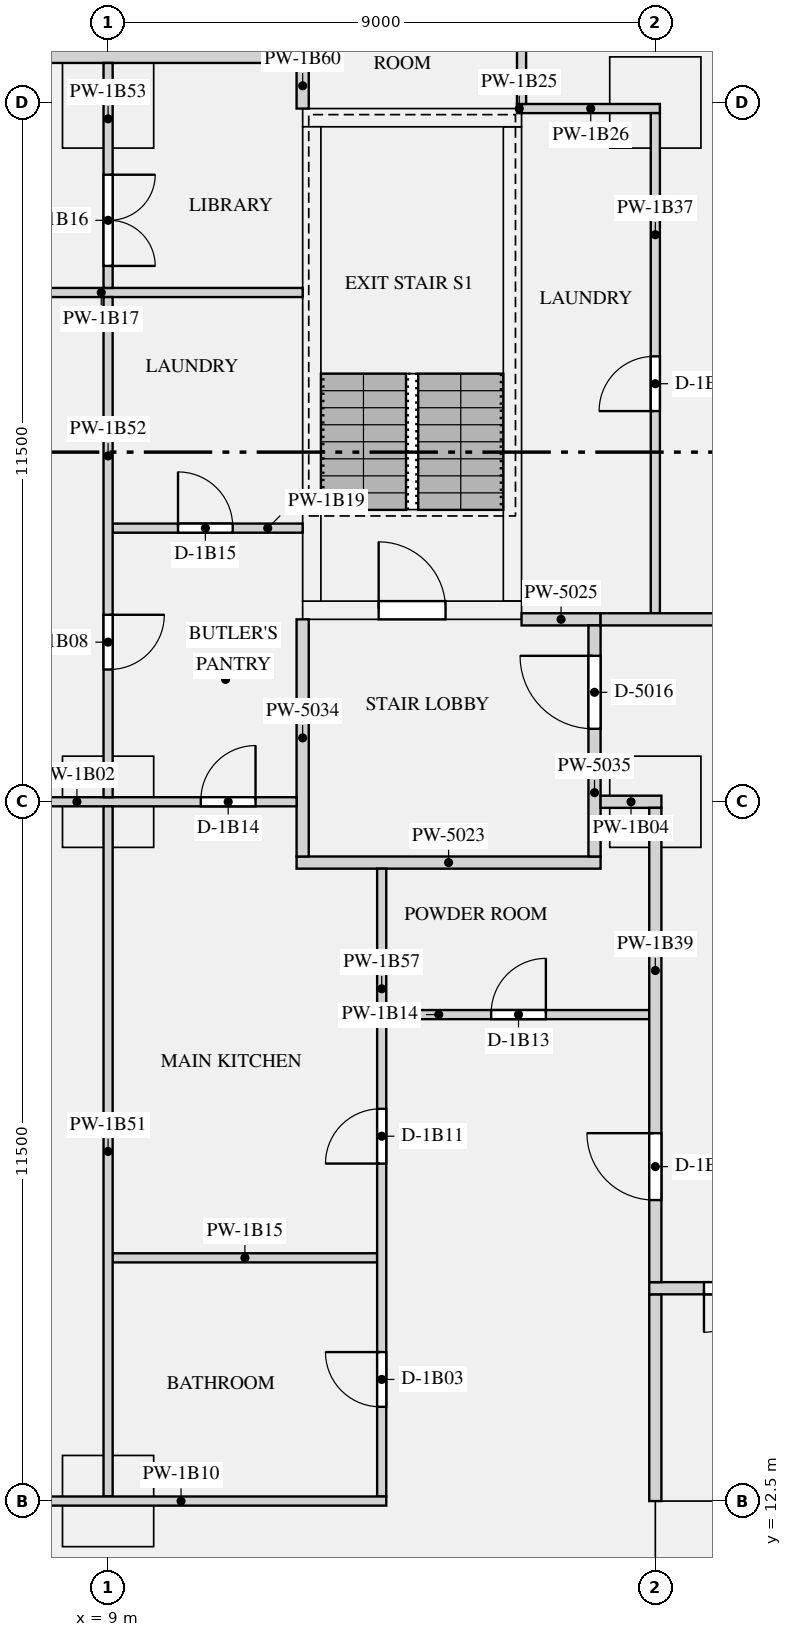
"""IFC4 building model, lengths in metres.
Left out: names, types, materials, properties, quantities, classifications, styles, units other than length and angle.
Written with IfcOpenShell. Run it as: python <this file> out.ifc"""

import sys

from ifc_helpers import new_model, si_unit, direction, frame, frame_2d, origin, origin_2d, place, context, subcontext, project, spatial, rectangle, extrude, element, fill, save


model = new_model("IFC4")
c1 = context("Model", 3, precision=1e-05, world=origin(), true_north=direction((0.0, 1.0)))
c2 = subcontext(c1, "Body", "Model", "MODEL_VIEW")
j1 = project(units=[si_unit("LENGTHUNIT", "METRE"), si_unit("PLANEANGLEUNIT", "RADIAN")], contexts=[c1])
p1 = place(None, origin())
s1 = spatial("IfcSite", under=j1, at=p1, CompositionType="ELEMENT")
p2 = place(p1, origin())
s2 = spatial("IfcBuilding", under=s1, at=p2, CompositionType="ELEMENT")
p3 = place(p2, frame((0.0, 0.0, 28.95)))
s3 = spatial("IfcBuildingStorey", under=s2, at=p3, CompositionType="ELEMENT", Elevation=28.95)
for number, where, z_axis, x_axis in (
    (1, (9.0, 24.0, 0.0), (0.0, 0.0, 1.0), (1.0, 0.0, 0.0)),
    (2, (18.0, 24.0, 0.0), (0.0, 0.0, 1.0), (1.0, 0.0, 0.0)),
    (3, (9.0, 35.5, 0.0), (0.0, 0.0, 1.0), (1.0, 0.0, 0.0)),
    (4, (18.0, 35.5, 0.0), (0.0, 0.0, 1.0), (1.0, 0.0, 0.0)),
    (5, (9.0, 12.5, 0.0), (0.0, 0.0, 1.0), (1.0, 0.0, 0.0)),
):
    element("IfcColumn", number, at=place(p3, frame(where, z_axis=z_axis, x_axis=x_axis)), inside=s3, PredefinedType="COLUMN", context=c2, shape_type="SweptSolid", body=[
        extrude(rectangle(XDim=1.5, YDim=1.5, at=origin_2d()), origin(), (0.0, 0.0, 1.0), 3.15),
    ])
p4 = place(p3, frame((18.5, 0.0, 0.0), z_axis=(0.0, 0.0, 1.0), x_axis=(0.0, 1.0, 0.0)))
e6 = element("IfcWall", 6, at=p4, inside=s3, PredefinedType="SHEAR", context=c2, shape_type="SweptSolid", body=[
    extrude(rectangle(XDim=12.5, YDim=1.0, at=frame_2d((6.25, 0.0))), origin(), (0.0, 0.0, 1.0), 3.15),
])
p5 = place(p3, frame((12.2, 27.15, 0.0), z_axis=(0.0, 0.0, 1.0), x_axis=(1.0, 0.0, 0.0)))
e7 = element("IfcWall", 7, at=p5, inside=s3, PredefinedType="SHEAR", context=c2, shape_type="SweptSolid", body=[
    extrude(rectangle(XDim=3.6, YDim=0.3, at=frame_2d((1.8, 0.0))), origin(), (0.0, 0.0, 1.0), 3.15),
])
p6 = place(p5, frame((1.25, 0.0, 0.0)))
e8 = element("IfcOpeningElement", 8, at=p6, cuts=e7, PredefinedType="OPENING", context=c2, shape_type="SweptSolid", body=[
    extrude(rectangle(XDim=1.1, YDim=2.1, at=frame_2d((0.55, 1.05))), frame((0.0, 0.16, 0.0), z_axis=(0.0, -1.0, 0.0), x_axis=(1.0, 0.0, 0.0)), (0.0, 0.0, 1.0), 0.32),
])
p7 = place(p3, frame((12.2, 35.25, 0.0), z_axis=(0.0, 0.0, 1.0), x_axis=(1.0, 0.0, 0.0)))
e9 = element("IfcWall", 9, at=p7, inside=s3, PredefinedType="SHEAR", context=c2, shape_type="SweptSolid", body=[
    extrude(rectangle(XDim=3.6, YDim=0.3, at=frame_2d((1.8, 0.0))), origin(), (0.0, 0.0, 1.0), 3.15),
])
for number, where, z_axis, x_axis in (
    (10, (12.35, 27.3, 0.0), (0.0, 0.0, 1.0), (0.0, 1.0, 0.0)),
    (11, (15.65, 27.3, 0.0), (0.0, 0.0, 1.0), (0.0, 1.0, 0.0)),
):
    element("IfcWall", number, at=place(p3, frame(where, z_axis=z_axis, x_axis=x_axis)), inside=s3, PredefinedType="SHEAR", context=c2, shape_type="SweptSolid", body=[
        extrude(rectangle(XDim=7.8, YDim=0.3, at=frame_2d((3.9, 0.0))), origin(), (0.0, 0.0, 1.0), 3.15),
    ])
p8 = place(p3, frame((12.1, 23.0, 0.0), z_axis=(0.0, 0.0, 1.0), x_axis=(1.0, 0.0, 0.0)))
e12 = element("IfcWall", 12, at=p8, inside=s3, PredefinedType="PARTITIONING", context=c2, shape_type="SweptSolid", body=[
    extrude(rectangle(XDim=5.0, YDim=0.2, at=frame_2d((2.5, 0.0))), origin(), (0.0, 0.0, 1.0), 2.83),
])
p9 = place(p3, frame((15.8, 27.0, 0.0), z_axis=(0.0, 0.0, 1.0), x_axis=(1.0, 0.0, 0.0)))
e13 = element("IfcWall", 13, at=p9, inside=s3, PredefinedType="PARTITIONING", context=c2, shape_type="SweptSolid", body=[
    extrude(rectangle(XDim=1.3, YDim=0.2, at=frame_2d((0.65, 0.0))), origin(), (0.0, 0.0, 1.0), 2.83),
])
p10 = place(p3, frame((18.0, 12.5, 0.0), z_axis=(0.0, 0.0, 1.0), x_axis=(0.0, 1.0, 0.0)))
e14 = element("IfcWall", 14, at=p10, inside=s3, PredefinedType="PARTITIONING", context=c2, shape_type="SweptSolid", body=[
    extrude(rectangle(XDim=3.4, YDim=0.2, at=frame_2d((1.7, 0.0))), origin(), (0.0, 0.0, 1.0), 2.83),
])
p11 = place(p3, frame((12.2, 23.1, 0.0), z_axis=(0.0, 0.0, 1.0), x_axis=(0.0, 1.0, 0.0)))
e15 = element("IfcWall", 15, at=p11, inside=s3, PredefinedType="PARTITIONING", context=c2, shape_type="SweptSolid", body=[
    extrude(rectangle(XDim=3.9, YDim=0.2, at=frame_2d((1.95, 0.0))), origin(), (0.0, 0.0, 1.0), 2.83),
])
p12 = place(p3, frame((17.0, 23.1, 0.0), z_axis=(0.0, 0.0, 1.0), x_axis=(0.0, 1.0, 0.0)))
e16 = element("IfcWall", 16, at=p12, inside=s3, PredefinedType="PARTITIONING", context=c2, shape_type="SweptSolid", body=[
    extrude(rectangle(XDim=3.8, YDim=0.2, at=frame_2d((1.9, 0.0))), origin(), (0.0, 0.0, 1.0), 2.83),
])
p13 = place(p12, frame((2.1, 0.0, 0.0)))
e17 = element("IfcOpeningElement", 17, at=p13, cuts=e16, PredefinedType="OPENING", context=c2, shape_type="SweptSolid", body=[
    extrude(rectangle(XDim=1.2, YDim=2.1, at=frame_2d((0.6, 1.05))), frame((0.0, 0.11, 0.0), z_axis=(0.0, -1.0, 0.0), x_axis=(1.0, 0.0, 0.0)), (0.0, 0.0, 1.0), 0.22),
])
p14 = place(p3, frame((3.3, 24.0, 0.0), z_axis=(0.0, 0.0, 1.0), x_axis=(1.0, 0.0, 0.0)))
e18 = element("IfcWall", 18, at=p14, inside=s3, PredefinedType="PARTITIONING", context=c2, shape_type="SweptSolid", body=[
    extrude(rectangle(XDim=8.8, YDim=0.15, at=frame_2d((4.4, 0.0))), origin(), (0.0, 0.0, 1.0), 2.83),
])
p15 = place(p14, frame((1.65, 0.0, 0.0)))
e19 = element("IfcOpeningElement", 19, at=p15, cuts=e18, PredefinedType="OPENING", context=c2, shape_type="SweptSolid", body=[
    extrude(rectangle(XDim=1.5, YDim=2.1, at=frame_2d((0.75, 1.05))), frame((0.0, 0.085, 0.0), z_axis=(0.0, -1.0, 0.0), x_axis=(1.0, 0.0, 0.0)), (0.0, 0.0, 1.0), 0.17),
])
p16 = place(p14, frame((7.225, 0.0, 0.0)))
e20 = element("IfcOpeningElement", 20, at=p16, cuts=e18, PredefinedType="OPENING", context=c2, shape_type="SweptSolid", body=[
    extrude(rectangle(XDim=0.9, YDim=2.1, at=frame_2d((0.45, 1.05))), frame((0.0, 0.085, 0.0), z_axis=(0.0, -1.0, 0.0), x_axis=(1.0, 0.0, 0.0)), (0.0, 0.0, 1.0), 0.17),
])
p17 = place(p3, frame((17.1, 24.0, 0.0), z_axis=(0.0, 0.0, 1.0), x_axis=(1.0, 0.0, 0.0)))
e21 = element("IfcWall", 21, at=p17, inside=s3, PredefinedType="PARTITIONING", context=c2, shape_type="SweptSolid", body=[
    extrude(rectangle(XDim=1.0, YDim=0.2, at=frame_2d((0.5, 0.0))), origin(), (0.0, 0.0, 1.0), 2.83),
])
p18 = place(p3, frame((17.1, 27.0, 0.0), z_axis=(0.0, 0.0, 1.0), x_axis=(1.0, 0.0, 0.0)))
e22 = element("IfcWall", 22, at=p18, inside=s3, PredefinedType="PARTITIONING", context=c2, shape_type="SweptSolid", body=[
    extrude(rectangle(XDim=7.0, YDim=0.2, at=frame_2d((3.5, 0.0))), origin(), (0.0, 0.0, 1.0), 2.83),
])
p19 = place(p3, frame((0.8, 12.5, 0.0), z_axis=(0.0, 0.0, 1.0), x_axis=(1.0, 0.0, 0.0)))
e23 = element("IfcWall", 23, at=p19, inside=s3, PredefinedType="PARTITIONING", context=c2, shape_type="SweptSolid", body=[
    extrude(rectangle(XDim=12.775, YDim=0.15, at=frame_2d((6.387, 0.0))), origin(), (0.0, 0.0, 1.0), 2.83),
])
p20 = place(p19, frame((5.125, 0.0, 0.0)))
e24 = element("IfcOpeningElement", 24, at=p20, cuts=e23, PredefinedType="OPENING", context=c2, shape_type="SweptSolid", body=[
    extrude(rectangle(XDim=0.9, YDim=2.1, at=frame_2d((0.45, 1.05))), frame((0.0, 0.085, 0.0), z_axis=(0.0, -1.0, 0.0), x_axis=(1.0, 0.0, 0.0)), (0.0, 0.0, 1.0), 0.17),
])
p21 = place(p3, frame((13.575, 20.5, 0.0), z_axis=(0.0, 0.0, 1.0), x_axis=(1.0, 0.0, 0.0)))
e25 = element("IfcWall", 25, at=p21, inside=s3, PredefinedType="PARTITIONING", context=c2, shape_type="SweptSolid", body=[
    extrude(rectangle(XDim=4.325, YDim=0.15, at=frame_2d((2.163, 0.0))), origin(), (0.0, 0.0, 1.0), 2.83),
])
p22 = place(p21, frame((1.725, 0.0, 0.0)))
e26 = element("IfcOpeningElement", 26, at=p22, cuts=e25, PredefinedType="OPENING", context=c2, shape_type="SweptSolid", body=[
    extrude(rectangle(XDim=0.9, YDim=2.1, at=frame_2d((0.45, 1.05))), frame((0.0, 0.085, 0.0), z_axis=(0.0, -1.0, 0.0), x_axis=(1.0, 0.0, 0.0)), (0.0, 0.0, 1.0), 0.17),
])
p23 = place(p3, frame((9.075, 16.5, 0.0), z_axis=(0.0, 0.0, 1.0), x_axis=(1.0, 0.0, 0.0)))
e27 = element("IfcWall", 27, at=p23, inside=s3, PredefinedType="PARTITIONING", context=c2, shape_type="SweptSolid", body=[
    extrude(rectangle(XDim=4.35, YDim=0.15, at=frame_2d((2.175, 0.0))), origin(), (0.0, 0.0, 1.0), 2.83),
])
p24 = place(p3, frame((0.8, 32.375, 0.0), z_axis=(0.0, 0.0, 1.0), x_axis=(1.0, 0.0, 0.0)))
e28 = element("IfcWall", 28, at=p24, inside=s3, PredefinedType="PARTITIONING", context=c2, shape_type="SweptSolid", body=[
    extrude(rectangle(XDim=11.4, YDim=0.15, at=frame_2d((5.7, 0.0))), origin(), (0.0, 0.0, 1.0), 2.83),
])
p25 = place(p24, frame((3.275, 0.0, 0.0)))
e29 = element("IfcOpeningElement", 29, at=p25, cuts=e28, PredefinedType="OPENING", context=c2, shape_type="SweptSolid", body=[
    extrude(rectangle(XDim=1.5, YDim=2.1, at=frame_2d((0.75, 1.05))), frame((0.0, 0.085, 0.0), z_axis=(0.0, -1.0, 0.0), x_axis=(1.0, 0.0, 0.0)), (0.0, 0.0, 1.0), 0.17),
])
p26 = place(p3, frame((9.075, 28.5, 0.0), z_axis=(0.0, 0.0, 1.0), x_axis=(1.0, 0.0, 0.0)))
e30 = element("IfcWall", 30, at=p26, inside=s3, PredefinedType="PARTITIONING", context=c2, shape_type="SweptSolid", body=[
    extrude(rectangle(XDim=3.125, YDim=0.15, at=frame_2d((1.562, 0.0))), origin(), (0.0, 0.0, 1.0), 2.83),
])
p27 = place(p26, frame((1.075, 0.0, 0.0)))
e31 = element("IfcOpeningElement", 31, at=p27, cuts=e30, PredefinedType="OPENING", context=c2, shape_type="SweptSolid", body=[
    extrude(rectangle(XDim=0.9, YDim=2.1, at=frame_2d((0.45, 1.05))), frame((0.0, 0.085, 0.0), z_axis=(0.0, -1.0, 0.0), x_axis=(1.0, 0.0, 0.0)), (0.0, 0.0, 1.0), 0.17),
])
p28 = place(p3, frame((0.8, 36.25, 0.0), z_axis=(0.0, 0.0, 1.0), x_axis=(1.0, 0.0, 0.0)))
e32 = element("IfcWall", 32, at=p28, inside=s3, PredefinedType="PARTITIONING", context=c2, shape_type="SweptSolid", body=[
    extrude(rectangle(XDim=11.475, YDim=0.2, at=frame_2d((5.737, 0.0))), origin(), (0.0, 0.0, 1.0), 2.83),
])
p29 = place(p3, frame((15.725, 35.4, 0.0), z_axis=(0.0, 0.0, 1.0), x_axis=(1.0, 0.0, 0.0)))
e33 = element("IfcWall", 33, at=p29, inside=s3, PredefinedType="PARTITIONING", context=c2, shape_type="SweptSolid", body=[
    extrude(rectangle(XDim=0.075, YDim=0.15, at=frame_2d((0.038, 0.0))), origin(), (0.0, 0.0, 1.0), 2.83),
])
p30 = place(p3, frame((15.8, 35.4, 0.0), z_axis=(0.0, 0.0, 1.0), x_axis=(1.0, 0.0, 0.0)))
e34 = element("IfcWall", 34, at=p30, inside=s3, PredefinedType="PARTITIONING", context=c2, shape_type="SweptSolid", body=[
    extrude(rectangle(XDim=2.275, YDim=0.15, at=frame_2d((1.137, 0.0))), origin(), (0.0, 0.0, 1.0), 2.83),
])
p31 = place(p3, frame((17.9, 16.0, 0.0), z_axis=(0.0, 0.0, 1.0), x_axis=(1.0, 0.0, 0.0)))
e35 = element("IfcWall", 35, at=p31, inside=s3, PredefinedType="PARTITIONING", context=c2, shape_type="SweptSolid", body=[
    extrude(rectangle(XDim=36.2, YDim=0.2, at=frame_2d((18.1, 0.0))), origin(), (0.0, 0.0, 1.0), 2.83),
])
p32 = place(p31, frame((0.9, 0.0, 0.0)))
e36 = element("IfcOpeningElement", 36, at=p32, cuts=e35, PredefinedType="OPENING", context=c2, shape_type="SweptSolid", body=[
    extrude(rectangle(XDim=1.4, YDim=2.1, at=frame_2d((0.7, 1.05))), frame((0.0, 0.11, 0.0), z_axis=(0.0, -1.0, 0.0), x_axis=(1.0, 0.0, 0.0)), (0.0, 0.0, 1.0), 0.22),
])
p33 = place(p31, frame((33.9, 0.0, 0.0)))
e37 = element("IfcOpeningElement", 37, at=p33, cuts=e35, PredefinedType="OPENING", context=c2, shape_type="SweptSolid", body=[
    extrude(rectangle(XDim=1.4, YDim=2.1, at=frame_2d((0.7, 1.05))), frame((0.0, 0.11, 0.0), z_axis=(0.0, -1.0, 0.0), x_axis=(1.0, 0.0, 0.0)), (0.0, 0.0, 1.0), 0.22),
])
p34 = place(p3, frame((18.0, 27.1, 0.0), z_axis=(0.0, 0.0, 1.0), x_axis=(0.0, 1.0, 0.0)))
e38 = element("IfcWall", 38, at=p34, inside=s3, PredefinedType="PARTITIONING", context=c2, shape_type="SweptSolid", body=[
    extrude(rectangle(XDim=8.225, YDim=0.15, at=frame_2d((4.112, 0.0))), origin(), (0.0, 0.0, 1.0), 2.83),
])
p35 = place(p34, frame((3.325, 0.0, 0.0)))
e39 = element("IfcOpeningElement", 39, at=p35, cuts=e38, PredefinedType="OPENING", context=c2, shape_type="SweptSolid", body=[
    extrude(rectangle(XDim=0.9, YDim=2.1, at=frame_2d((0.45, 1.05))), frame((0.0, 0.085, 0.0), z_axis=(0.0, -1.0, 0.0), x_axis=(1.0, 0.0, 0.0)), (0.0, 0.0, 1.0), 0.17),
])
p36 = place(p3, frame((18.0, 16.1, 0.0), z_axis=(0.0, 0.0, 1.0), x_axis=(0.0, 1.0, 0.0)))
e40 = element("IfcWall", 40, at=p36, inside=s3, PredefinedType="PARTITIONING", context=c2, shape_type="SweptSolid", body=[
    extrude(rectangle(XDim=7.8, YDim=0.2, at=frame_2d((3.9, 0.0))), origin(), (0.0, 0.0, 1.0), 2.83),
])
p37 = place(p36, frame((1.35, 0.0, 0.0)))
e41 = element("IfcOpeningElement", 41, at=p37, cuts=e40, PredefinedType="OPENING", context=c2, shape_type="SweptSolid", body=[
    extrude(rectangle(XDim=1.1, YDim=2.1, at=frame_2d((0.55, 1.05))), frame((0.0, 0.11, 0.0), z_axis=(0.0, -1.0, 0.0), x_axis=(1.0, 0.0, 0.0)), (0.0, 0.0, 1.0), 0.22),
])
p38 = place(p3, frame((9.0, 12.575, 0.0), z_axis=(0.0, 0.0, 1.0), x_axis=(0.0, 1.0, 0.0)))
e42 = element("IfcWall", 42, at=p38, inside=s3, PredefinedType="PARTITIONING", context=c2, shape_type="SweptSolid", body=[
    extrude(rectangle(XDim=11.35, YDim=0.15, at=frame_2d((5.675, 0.0))), origin(), (0.0, 0.0, 1.0), 2.83),
])
p39 = place(p3, frame((9.0, 24.075, 0.0), z_axis=(0.0, 0.0, 1.0), x_axis=(0.0, 1.0, 0.0)))
e43 = element("IfcWall", 43, at=p39, inside=s3, PredefinedType="PARTITIONING", context=c2, shape_type="SweptSolid", body=[
    extrude(rectangle(XDim=8.225, YDim=0.15, at=frame_2d((4.113, 0.0))), origin(), (0.0, 0.0, 1.0), 2.83),
])
p40 = place(p39, frame((2.1, 0.0, 0.0)))
e44 = element("IfcOpeningElement", 44, at=p40, cuts=e43, PredefinedType="OPENING", context=c2, shape_type="SweptSolid", body=[
    extrude(rectangle(XDim=0.9, YDim=2.1, at=frame_2d((0.45, 1.05))), frame((0.0, 0.085, 0.0), z_axis=(0.0, -1.0, 0.0), x_axis=(1.0, 0.0, 0.0)), (0.0, 0.0, 1.0), 0.17),
])
p41 = place(p3, frame((9.0, 32.45, 0.0), z_axis=(0.0, 0.0, 1.0), x_axis=(0.0, 1.0, 0.0)))
e45 = element("IfcWall", 45, at=p41, inside=s3, PredefinedType="PARTITIONING", context=c2, shape_type="SweptSolid", body=[
    extrude(rectangle(XDim=3.7, YDim=0.15, at=frame_2d((1.85, 0.0))), origin(), (0.0, 0.0, 1.0), 2.83),
])
p42 = place(p41, frame((0.362, 0.0, 0.0)))
e46 = element("IfcOpeningElement", 46, at=p42, cuts=e45, PredefinedType="OPENING", context=c2, shape_type="SweptSolid", body=[
    extrude(rectangle(XDim=1.5, YDim=2.1, at=frame_2d((0.75, 1.05))), frame((0.0, 0.085, 0.0), z_axis=(0.0, -1.0, 0.0), x_axis=(1.0, 0.0, 0.0)), (0.0, 0.0, 1.0), 0.17),
])
p43 = place(p3, frame((13.5, 12.575, 0.0), z_axis=(0.0, 0.0, 1.0), x_axis=(0.0, 1.0, 0.0)))
e47 = element("IfcWall", 47, at=p43, inside=s3, PredefinedType="PARTITIONING", context=c2, shape_type="SweptSolid", body=[
    extrude(rectangle(XDim=10.325, YDim=0.15, at=frame_2d((5.163, 0.0))), origin(), (0.0, 0.0, 1.0), 2.83),
])
p44 = place(p43, frame((1.475, 0.0, 0.0)))
e48 = element("IfcOpeningElement", 48, at=p44, cuts=e47, PredefinedType="OPENING", context=c2, shape_type="SweptSolid", body=[
    extrude(rectangle(XDim=0.9, YDim=2.1, at=frame_2d((0.45, 1.05))), frame((0.0, 0.085, 0.0), z_axis=(0.0, -1.0, 0.0), x_axis=(1.0, 0.0, 0.0)), (0.0, 0.0, 1.0), 0.17),
])
p45 = place(p43, frame((5.475, 0.0, 0.0)))
e49 = element("IfcOpeningElement", 49, at=p45, cuts=e47, PredefinedType="OPENING", context=c2, shape_type="SweptSolid", body=[
    extrude(rectangle(XDim=0.9, YDim=2.1, at=frame_2d((0.45, 1.05))), frame((0.0, 0.085, 0.0), z_axis=(0.0, -1.0, 0.0), x_axis=(1.0, 0.0, 0.0)), (0.0, 0.0, 1.0), 0.17),
])
p46 = place(p3, frame((12.2, 35.4, 0.0), z_axis=(0.0, 0.0, 1.0), x_axis=(0.0, 1.0, 0.0)))
e50 = element("IfcWall", 50, at=p46, inside=s3, PredefinedType="PARTITIONING", context=c2, shape_type="SweptSolid", body=[
    extrude(rectangle(XDim=0.75, YDim=0.2, at=frame_2d((0.375, 0.0))), origin(), (0.0, 0.0, 1.0), 2.83),
])
p47 = place(p3, frame((15.8, 35.475, 0.0), z_axis=(0.0, 0.0, 1.0), x_axis=(0.0, 1.0, 0.0)))
e51 = element("IfcWall", 51, at=p47, inside=s3, PredefinedType="PARTITIONING", context=c2, shape_type="SweptSolid", body=[
    extrude(rectangle(XDim=2.45, YDim=0.15, at=frame_2d((1.225, 0.0))), origin(), (0.0, 0.0, 1.0), 2.83),
])
p48 = place(p6, origin())
e52 = element("IfcDoor", 52, at=p48, inside=s3, OperationType="SINGLE_SWING_LEFT", PredefinedType="DOOR", context=c2, shape_type="SweptSolid", body=[
    extrude(rectangle(XDim=1.1, YDim=2.1, at=frame_2d((0.55, 1.05))), frame((0.0, 0.025, 0.0), z_axis=(0.0, -1.0, 0.0), x_axis=(1.0, 0.0, 0.0)), (0.0, 0.0, 1.0), 0.05),
])
fill(e8, e52)
p49 = place(p13, origin())
e53 = element("IfcDoor", 53, at=p49, inside=s3, OperationType="SINGLE_SWING_RIGHT", PredefinedType="DOOR", context=c2, shape_type="SweptSolid", body=[
    extrude(rectangle(XDim=1.2, YDim=2.1, at=frame_2d((0.6, 1.05))), frame((0.0, 0.025, 0.0), z_axis=(0.0, -1.0, 0.0), x_axis=(1.0, 0.0, 0.0)), (0.0, 0.0, 1.0), 0.05),
])
fill(e17, e53)
p50 = place(p32, frame((1.4, 0.0, 0.0), z_axis=(0.0, 0.0, 1.0), x_axis=(-1.0, 0.0, 0.0)))
e54 = element("IfcDoor", 54, at=p50, inside=s3, OperationType="DOUBLE_DOOR_SINGLE_SWING", PredefinedType="DOOR", context=c2, shape_type="SweptSolid", body=[
    extrude(rectangle(XDim=1.4, YDim=2.1, at=frame_2d((0.7, 1.05))), frame((0.0, 0.025, 0.0), z_axis=(0.0, -1.0, 0.0), x_axis=(1.0, 0.0, 0.0)), (0.0, 0.0, 1.0), 0.05),
])
fill(e36, e54)
p51 = place(p44, origin())
e55 = element("IfcDoor", 55, at=p51, inside=s3, OperationType="SINGLE_SWING_RIGHT", PredefinedType="DOOR", context=c2, shape_type="SweptSolid", body=[
    extrude(rectangle(XDim=0.9, YDim=2.1, at=frame_2d((0.45, 1.05))), frame((0.0, 0.025, 0.0), z_axis=(0.0, -1.0, 0.0), x_axis=(1.0, 0.0, 0.0)), (0.0, 0.0, 1.0), 0.05),
])
fill(e48, e55)
p52 = place(p40, frame((0.9, 0.0, 0.0), z_axis=(0.0, 0.0, 1.0), x_axis=(-1.0, 0.0, 0.0)))
e56 = element("IfcDoor", 56, at=p52, inside=s3, OperationType="SINGLE_SWING_LEFT", PredefinedType="DOOR", context=c2, shape_type="SweptSolid", body=[
    extrude(rectangle(XDim=0.9, YDim=2.1, at=frame_2d((0.45, 1.05))), frame((0.0, 0.025, 0.0), z_axis=(0.0, -1.0, 0.0), x_axis=(1.0, 0.0, 0.0)), (0.0, 0.0, 1.0), 0.05),
])
fill(e44, e56)
p53 = place(p45, origin())
e57 = element("IfcDoor", 57, at=p53, inside=s3, OperationType="SINGLE_SWING_LEFT", PredefinedType="DOOR", context=c2, shape_type="SweptSolid", body=[
    extrude(rectangle(XDim=0.9, YDim=2.1, at=frame_2d((0.45, 1.05))), frame((0.0, 0.025, 0.0), z_axis=(0.0, -1.0, 0.0), x_axis=(1.0, 0.0, 0.0)), (0.0, 0.0, 1.0), 0.05),
])
fill(e49, e57)
p54 = place(p22, origin())
e58 = element("IfcDoor", 58, at=p54, inside=s3, OperationType="SINGLE_SWING_RIGHT", PredefinedType="DOOR", context=c2, shape_type="SweptSolid", body=[
    extrude(rectangle(XDim=0.9, YDim=2.1, at=frame_2d((0.45, 1.05))), frame((0.0, 0.025, 0.0), z_axis=(0.0, -1.0, 0.0), x_axis=(1.0, 0.0, 0.0)), (0.0, 0.0, 1.0), 0.05),
])
fill(e26, e58)
p55 = place(p16, origin())
e59 = element("IfcDoor", 59, at=p55, inside=s3, OperationType="SINGLE_SWING_RIGHT", PredefinedType="DOOR", context=c2, shape_type="SweptSolid", body=[
    extrude(rectangle(XDim=0.9, YDim=2.1, at=frame_2d((0.45, 1.05))), frame((0.0, 0.025, 0.0), z_axis=(0.0, -1.0, 0.0), x_axis=(1.0, 0.0, 0.0)), (0.0, 0.0, 1.0), 0.05),
])
fill(e20, e59)
p56 = place(p27, origin())
e60 = element("IfcDoor", 60, at=p56, inside=s3, OperationType="SINGLE_SWING_LEFT", PredefinedType="DOOR", context=c2, shape_type="SweptSolid", body=[
    extrude(rectangle(XDim=0.9, YDim=2.1, at=frame_2d((0.45, 1.05))), frame((0.0, 0.025, 0.0), z_axis=(0.0, -1.0, 0.0), x_axis=(1.0, 0.0, 0.0)), (0.0, 0.0, 1.0), 0.05),
])
fill(e31, e60)
p57 = place(p42, frame((1.5, 0.0, 0.0), z_axis=(0.0, 0.0, 1.0), x_axis=(-1.0, 0.0, 0.0)))
e61 = element("IfcDoor", 61, at=p57, inside=s3, OperationType="DOUBLE_DOOR_SINGLE_SWING", PredefinedType="DOOR", context=c2, shape_type="SweptSolid", body=[
    extrude(rectangle(XDim=1.5, YDim=2.1, at=frame_2d((0.75, 1.05))), frame((0.0, 0.025, 0.0), z_axis=(0.0, -1.0, 0.0), x_axis=(1.0, 0.0, 0.0)), (0.0, 0.0, 1.0), 0.05),
])
fill(e46, e61)
p58 = place(p37, origin())
e62 = element("IfcDoor", 62, at=p58, inside=s3, OperationType="SINGLE_SWING_RIGHT", PredefinedType="DOOR", context=c2, shape_type="SweptSolid", body=[
    extrude(rectangle(XDim=1.1, YDim=2.1, at=frame_2d((0.55, 1.05))), frame((0.0, 0.025, 0.0), z_axis=(0.0, -1.0, 0.0), x_axis=(1.0, 0.0, 0.0)), (0.0, 0.0, 1.0), 0.05),
])
fill(e41, e62)
p59 = place(p35, origin())
e63 = element("IfcDoor", 63, at=p59, inside=s3, OperationType="SINGLE_SWING_LEFT", PredefinedType="DOOR", context=c2, shape_type="SweptSolid", body=[
    extrude(rectangle(XDim=0.9, YDim=2.1, at=frame_2d((0.45, 1.05))), frame((0.0, 0.025, 0.0), z_axis=(0.0, -1.0, 0.0), x_axis=(1.0, 0.0, 0.0)), (0.0, 0.0, 1.0), 0.05),
])
fill(e39, e63)
save(model, sys.argv[1])
